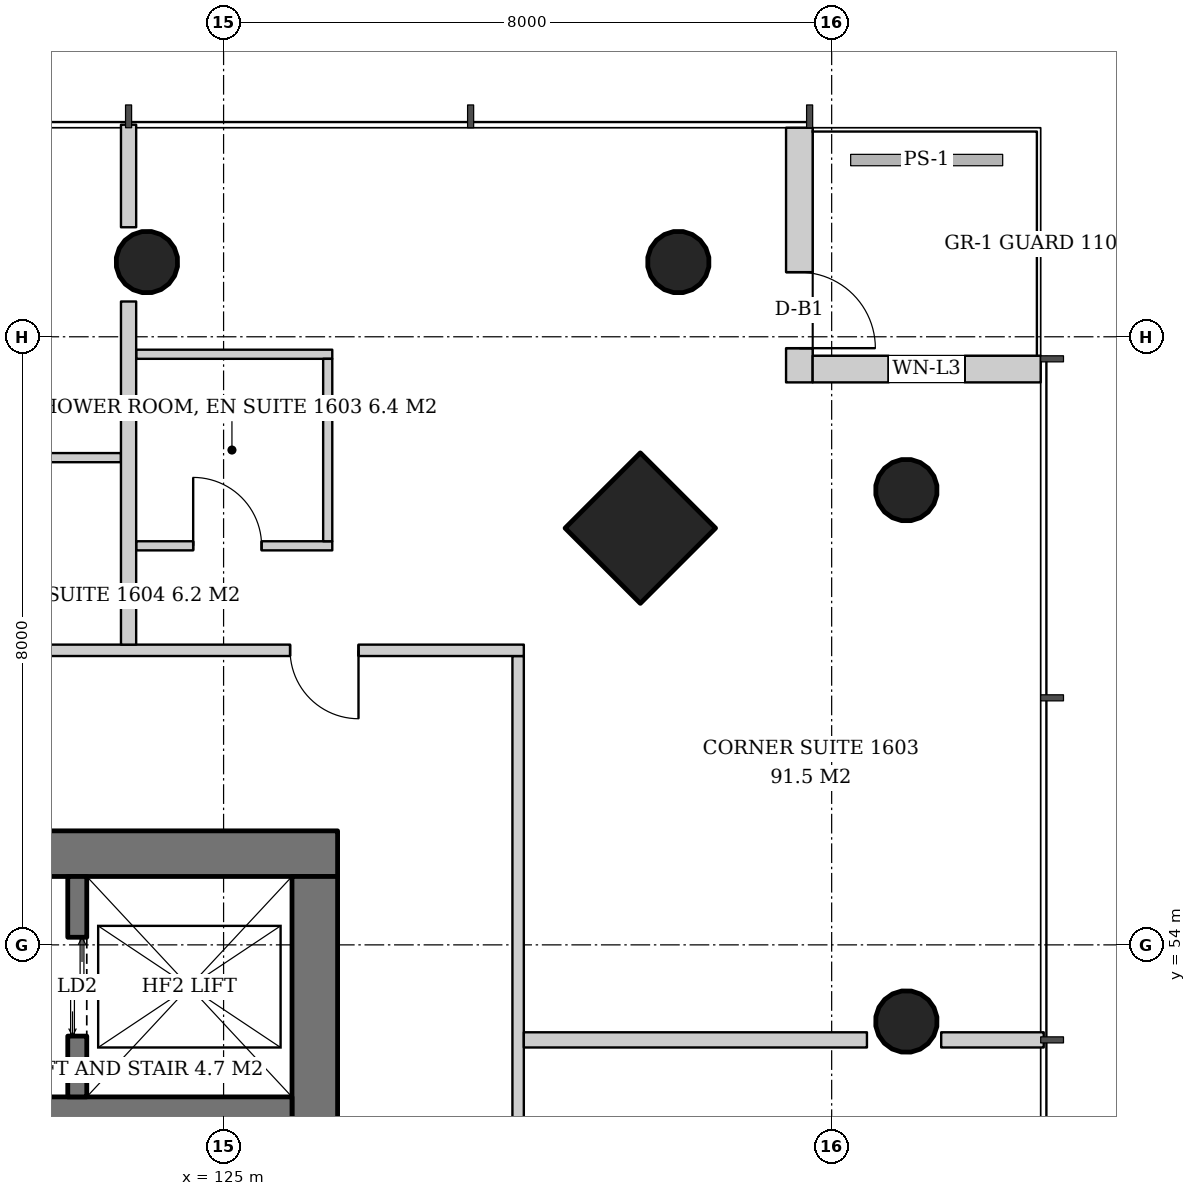
"""IFC4 building model, lengths in metres.
Left out: names, types, materials, properties, quantities, classifications, styles, units other than length and angle.
Written with IfcOpenShell. Run it as: python <this file> out.ifc"""

import sys

from ifc_helpers import new_model, si_unit, direction, frame, frame_2d, origin, origin_2d, place, context, subcontext, project, spatial, rectangle, hollow_circle, extrude, element, fill, save


model = new_model("IFC4")
c1 = context("Model", 3, precision=1e-05, world=origin(), true_north=direction((0.0, 1.0)))
c2 = subcontext(c1, "Body", "Model", "MODEL_VIEW")
j1 = project(units=[si_unit("LENGTHUNIT", "METRE"), si_unit("PLANEANGLEUNIT", "RADIAN")], contexts=[c1])
p1 = place(None, origin())
s1 = spatial("IfcSite", under=j1, at=p1, CompositionType="ELEMENT")
p2 = place(p1, origin())
s2 = spatial("IfcBuilding", under=s1, at=p2, CompositionType="ELEMENT")
p3 = place(p2, frame((0.0, 0.0, 66.6)))
s3 = spatial("IfcBuildingStorey", under=s2, at=p3, CompositionType="ELEMENT", Elevation=66.6)
p4 = place(p3, frame((130.534, 59.534, 0.0), z_axis=(-0.043032401563, -0.043032401563, 0.998146494675), x_axis=(0.707106781187, -0.707106781187, 0.0)))
e1 = element("IfcColumn", 1, at=p4, inside=s3, PredefinedType="COLUMN", context=c2, shape_type="SweptSolid", body=[
    extrude(rectangle(XDim=1.4, YDim=1.4, at=origin_2d()), origin(), (0.0, 0.0, 1.0), 3.807),
])
p5 = place(p3, frame((134.034, 60.034, 0.0), z_axis=(-0.043032401563, -0.043032401563, 0.998146494675), x_axis=(0.707106781187, -0.707106781187, 0.0)))
e2 = element("IfcColumn", 2, at=p5, inside=s3, PredefinedType="COLUMN", context=c2, shape_type="SweptSolid", body=[
    extrude(hollow_circle(Radius=0.406, WallThickness=0.03, at=origin_2d()), origin(), (0.0, 0.0, 1.0), 3.807),
])
p6 = place(p3, frame((134.034, 53.017, 0.0), z_axis=(-0.043062285527, -0.021563230905, 0.998839660125), x_axis=(0.44774654769, -0.894160516368, 0.0)))
e3 = element("IfcColumn", 3, at=p6, inside=s3, PredefinedType="COLUMN", context=c2, shape_type="SweptSolid", body=[
    extrude(hollow_circle(Radius=0.406, WallThickness=0.03, at=origin_2d()), origin(), (0.0, 0.0, 1.0), 3.804),
])
p7 = place(p3, frame((131.034, 63.034, 0.0), z_axis=(-0.043032401563, -0.043032401563, 0.998146494675), x_axis=(0.707106781187, -0.707106781187, 0.0)))
e4 = element("IfcColumn", 4, at=p7, inside=s3, PredefinedType="COLUMN", context=c2, shape_type="SweptSolid", body=[
    extrude(hollow_circle(Radius=0.406, WallThickness=0.03, at=origin_2d()), origin(), (0.0, 0.0, 1.0), 3.807),
])
p8 = place(p3, frame((124.017, 63.034, 0.0), z_axis=(-0.021563230905, -0.043062285527, 0.998839660125), x_axis=(0.894160516368, -0.44774654769, 0.0)))
e5 = element("IfcColumn", 5, at=p8, inside=s3, PredefinedType="COLUMN", context=c2, shape_type="SweptSolid", body=[
    extrude(hollow_circle(Radius=0.406, WallThickness=0.03, at=origin_2d()), origin(), (0.0, 0.0, 1.0), 3.804),
])
p9 = place(p3, frame((107.5, 55.2, 0.0), z_axis=(0.0, 0.0, 1.0), x_axis=(1.0, 0.0, 0.0)))
e6 = element("IfcWall", 6, at=p9, inside=s3, PredefinedType="SHEAR", context=c2, shape_type="SweptSolid", body=[
    extrude(rectangle(XDim=19.0, YDim=0.6, at=frame_2d((9.5, 0.0))), origin(), (0.0, 0.0, 1.0), 3.8),
])
p10 = place(p9, frame((14.14, 0.0, 0.0)))
e7 = element("IfcOpeningElement", 7, at=p10, cuts=e6, PredefinedType="OPENING", context=c2, shape_type="SweptSolid", body=[
    extrude(rectangle(XDim=1.0, YDim=2.1, at=frame_2d((0.5, 1.05))), frame((0.0, 0.31, 0.0), z_axis=(0.0, -1.0, 0.0), x_axis=(1.0, 0.0, 0.0)), (0.0, 0.0, 1.0), 0.62),
])
p11 = place(p9, frame((0.931, 0.0, 0.0)))
e8 = element("IfcOpeningElement", 8, at=p11, cuts=e6, PredefinedType="OPENING", context=c2, shape_type="SweptSolid", body=[
    extrude(rectangle(XDim=1.0, YDim=2.1, at=frame_2d((0.5, 1.05))), frame((0.0, 0.31, 0.0), z_axis=(0.0, -1.0, 0.0), x_axis=(1.0, 0.0, 0.0)), (0.0, 0.0, 1.0), 0.62),
])
p12 = place(p9, frame((2.448, 0.0, 0.0)))
e9 = element("IfcOpeningElement", 9, at=p12, cuts=e6, PredefinedType="OPENING", context=c2, shape_type="SweptSolid", body=[
    extrude(rectangle(XDim=1.0, YDim=2.1, at=frame_2d((0.5, 1.05))), frame((0.0, 0.31, 0.0), z_axis=(0.0, -1.0, 0.0), x_axis=(1.0, 0.0, 0.0)), (0.0, 0.0, 1.0), 0.62),
])
p13 = place(p9, frame((3.983, 0.0, 0.0)))
e10 = element("IfcOpeningElement", 10, at=p13, cuts=e6, PredefinedType="OPENING", context=c2, shape_type="SweptSolid", body=[
    extrude(rectangle(XDim=1.0, YDim=2.1, at=frame_2d((0.5, 1.05))), frame((0.0, 0.31, 0.0), z_axis=(0.0, -1.0, 0.0), x_axis=(1.0, 0.0, 0.0)), (0.0, 0.0, 1.0), 0.62),
])
p14 = place(p3, frame((126.2, 37.1, 0.0), z_axis=(0.0, 0.0, 1.0), x_axis=(0.0, 1.0, 0.0)))
e11 = element("IfcWall", 11, at=p14, inside=s3, PredefinedType="SHEAR", context=c2, shape_type="SweptSolid", body=[
    extrude(rectangle(XDim=17.8, YDim=0.6, at=frame_2d((8.9, 0.0))), origin(), (0.0, 0.0, 1.0), 3.8),
])
p15 = place(p14, frame((8.0, 0.0, 0.0)))
e12 = element("IfcOpeningElement", 12, at=p15, cuts=e11, PredefinedType="OPENING", context=c2, shape_type="SweptSolid", body=[
    extrude(rectangle(XDim=1.8, YDim=2.4, at=frame_2d((0.9, 1.2))), frame((0.0, 0.31, 0.0), z_axis=(0.0, -1.0, 0.0), x_axis=(1.0, 0.0, 0.0)), (0.0, 0.0, 1.0), 0.62),
])
p16 = place(p3, frame((108.1, 51.8, 0.0), z_axis=(0.0, 0.0, 1.0), x_axis=(1.0, 0.0, 0.0)))
e13 = element("IfcWall", 13, at=p16, inside=s3, PredefinedType="SHEAR", context=c2, shape_type="SweptSolid", body=[
    extrude(rectangle(XDim=17.8, YDim=0.4, at=frame_2d((8.9, 0.0))), origin(), (0.0, 0.0, 1.0), 3.8),
])
p17 = place(p3, frame((132.575, 64.75, 0.0), z_axis=(0.0, 0.0, 1.0), x_axis=(0.0, -1.0, 0.0)))
e14 = element("IfcWall", 14, at=p17, inside=s3, PredefinedType="SOLIDWALL", context=c2, shape_type="SweptSolid", body=[
    extrude(rectangle(XDim=3.35, YDim=0.35, at=frame_2d((1.675, 0.0))), origin(), (0.0, 0.0, 1.0), 3.6),
])
p18 = place(p17, frame((1.9, 0.0, 0.0)))
e15 = element("IfcOpeningElement", 15, at=p18, cuts=e14, PredefinedType="OPENING", context=c2, shape_type="SweptSolid", body=[
    extrude(rectangle(XDim=1.0, YDim=2.4, at=frame_2d((0.5, 1.2))), frame((0.0, 0.185, 0.0), z_axis=(0.0, -1.0, 0.0), x_axis=(1.0, 0.0, 0.0)), (0.0, 0.0, 1.0), 0.37),
])
p19 = place(p3, frame((132.75, 61.575, 0.0), z_axis=(0.0, 0.0, 1.0), x_axis=(1.0, 0.0, 0.0)))
e16 = element("IfcWall", 16, at=p19, inside=s3, PredefinedType="SOLIDWALL", context=c2, shape_type="SweptSolid", body=[
    extrude(rectangle(XDim=3.0, YDim=0.35, at=frame_2d((1.5, 0.0))), origin(), (0.0, 0.0, 1.0), 3.6),
])
p20 = place(p19, frame((1.0, 0.0, 0.9)))
e17 = element("IfcOpeningElement", 17, at=p20, cuts=e16, PredefinedType="OPENING", context=c2, shape_type="SweptSolid", body=[
    extrude(rectangle(XDim=1.0, YDim=2.4, at=frame_2d((0.5, 1.2))), frame((0.0, 0.185, 0.0), z_axis=(0.0, -1.0, 0.0), x_axis=(1.0, 0.0, 0.0)), (0.0, 0.0, 1.0), 0.37),
])
p21 = place(p3, frame((123.075, 52.0, 0.0), z_axis=(0.0, 0.0, 1.0), x_axis=(0.0, 1.0, 0.0)))
e18 = element("IfcWall", 18, at=p21, inside=s3, PredefinedType="SHEAR", context=c2, shape_type="SweptSolid", body=[
    extrude(rectangle(XDim=2.9, YDim=0.25, at=frame_2d((1.45, 0.0))), origin(), (0.0, 0.0, 1.0), 3.8),
])
p22 = place(p21, frame((0.8, 0.0, 0.0)))
e19 = element("IfcOpeningElement", 19, at=p22, cuts=e18, PredefinedType="OPENING", context=c2, shape_type="SweptSolid", body=[
    extrude(rectangle(XDim=1.3, YDim=2.2, at=frame_2d((0.65, 1.1))), frame((0.0, 0.135, 0.0), z_axis=(0.0, -1.0, 0.0), x_axis=(1.0, 0.0, 0.0)), (0.0, 0.0, 1.0), 0.27),
])
p23 = place(p3, frame((128.875, 34.05, 0.0), z_axis=(0.0, 0.0, 1.0), x_axis=(0.0, 1.0, 0.0)))
e20 = element("IfcWall", 20, at=p23, inside=s3, PredefinedType="PARTITIONING", context=c2, shape_type="SweptSolid", body=[
    extrude(rectangle(XDim=23.75, YDim=0.15, at=frame_2d((11.875, 0.0))), origin(), (0.0, 0.0, 1.0), 2.8),
])
p24 = place(p23, frame((2.175, 0.0, 0.0)))
e21 = element("IfcOpeningElement", 21, at=p24, cuts=e20, PredefinedType="OPENING", context=c2, shape_type="SweptSolid", body=[
    extrude(rectangle(XDim=0.9, YDim=2.1, at=frame_2d((0.45, 1.05))), frame((0.0, 0.085, 0.0), z_axis=(0.0, -1.0, 0.0), x_axis=(1.0, 0.0, 0.0)), (0.0, 0.0, 1.0), 0.17),
])
p25 = place(p23, frame((12.45, 0.0, 0.0)))
e22 = element("IfcOpeningElement", 22, at=p25, cuts=e20, PredefinedType="OPENING", context=c2, shape_type="SweptSolid", body=[
    extrude(rectangle(XDim=0.9, YDim=2.1, at=frame_2d((0.45, 1.05))), frame((0.0, 0.085, 0.0), z_axis=(0.0, -1.0, 0.0), x_axis=(1.0, 0.0, 0.0)), (0.0, 0.0, 1.0), 0.17),
])
p26 = place(p3, frame((128.95, 52.75, 0.0), z_axis=(0.0, 0.0, 1.0), x_axis=(1.0, 0.0, 0.0)))
e23 = element("IfcWall", 23, at=p26, inside=s3, PredefinedType="PARTITIONING", context=c2, shape_type="SweptSolid", body=[
    extrude(rectangle(XDim=4.514, YDim=0.2, at=frame_2d((2.257, 0.0))), origin(), (0.0, 0.0, 1.0), 3.6),
])
p27 = place(p3, frame((134.441, 52.75, 0.0), z_axis=(0.0, 0.0, 1.0), x_axis=(1.0, 0.0, 0.0)))
e24 = element("IfcWall", 24, at=p27, inside=s3, PredefinedType="PARTITIONING", context=c2, shape_type="SweptSolid", body=[
    extrude(rectangle(XDim=1.349, YDim=0.2, at=frame_2d((0.675, 0.0))), origin(), (0.0, 0.0, 1.0), 3.6),
])
p28 = place(p3, frame((123.85, 59.25, 0.0), z_axis=(0.0, 0.0, 1.0), x_axis=(1.0, 0.0, 0.0)))
e25 = element("IfcWall", 25, at=p28, inside=s3, PredefinedType="PARTITIONING", context=c2, shape_type="SweptSolid", body=[
    extrude(rectangle(XDim=2.58, YDim=0.12, at=frame_2d((1.29, 0.0))), origin(), (0.0, 0.0, 1.0), 2.8),
])
p29 = place(p28, frame((0.75, 0.0, 0.0)))
e26 = element("IfcOpeningElement", 26, at=p29, cuts=e25, PredefinedType="OPENING", context=c2, shape_type="SweptSolid", body=[
    extrude(rectangle(XDim=0.9, YDim=2.1, at=frame_2d((0.45, 1.05))), frame((0.0, 0.07, 0.0), z_axis=(0.0, -1.0, 0.0), x_axis=(1.0, 0.0, 0.0)), (0.0, 0.0, 1.0), 0.14),
])
p30 = place(p3, frame((123.85, 61.77, 0.0), z_axis=(0.0, 0.0, 1.0), x_axis=(1.0, 0.0, 0.0)))
e27 = element("IfcWall", 27, at=p30, inside=s3, PredefinedType="PARTITIONING", context=c2, shape_type="SweptSolid", body=[
    extrude(rectangle(XDim=2.58, YDim=0.12, at=frame_2d((1.29, 0.0))), origin(), (0.0, 0.0, 1.0), 2.8),
])
p31 = place(p3, frame((126.37, 59.31, 0.0), z_axis=(0.0, 0.0, 1.0), x_axis=(0.0, 1.0, 0.0)))
e28 = element("IfcWall", 28, at=p31, inside=s3, PredefinedType="PARTITIONING", context=c2, shape_type="SweptSolid", body=[
    extrude(rectangle(XDim=2.4, YDim=0.12, at=frame_2d((1.2, 0.0))), origin(), (0.0, 0.0, 1.0), 2.8),
])
p32 = place(p3, frame((123.65, 60.41, 0.0), z_axis=(0.0, 0.0, 1.0), x_axis=(-1.0, 0.0, 0.0)))
e29 = element("IfcWall", 29, at=p32, inside=s3, PredefinedType="PARTITIONING", context=c2, shape_type="SweptSolid", body=[
    extrude(rectangle(XDim=2.42, YDim=0.12, at=frame_2d((1.21, 0.0))), origin(), (0.0, 0.0, 1.0), 2.847),
])
p33 = place(p3, frame((128.95, 57.875, 0.0), z_axis=(0.0, 0.0, 1.0), x_axis=(-1.0, 0.0, 0.0)))
e30 = element("IfcWall", 30, at=p33, inside=s3, PredefinedType="PARTITIONING", context=c2, shape_type="SweptSolid", body=[
    extrude(rectangle(XDim=23.75, YDim=0.15, at=frame_2d((11.875, 0.0))), origin(), (0.0, 0.0, 1.0), 2.8),
])
p34 = place(p33, frame((2.175, 0.0, 0.0)))
e31 = element("IfcOpeningElement", 31, at=p34, cuts=e30, PredefinedType="OPENING", context=c2, shape_type="SweptSolid", body=[
    extrude(rectangle(XDim=0.9, YDim=2.1, at=frame_2d((0.45, 1.05))), frame((0.0, 0.085, 0.0), z_axis=(0.0, -1.0, 0.0), x_axis=(1.0, 0.0, 0.0)), (0.0, 0.0, 1.0), 0.17),
])
p35 = place(p33, frame((7.95, 0.0, 0.0)))
e32 = element("IfcOpeningElement", 32, at=p35, cuts=e30, PredefinedType="OPENING", context=c2, shape_type="SweptSolid", body=[
    extrude(rectangle(XDim=0.9, YDim=2.1, at=frame_2d((0.45, 1.05))), frame((0.0, 0.085, 0.0), z_axis=(0.0, -1.0, 0.0), x_axis=(1.0, 0.0, 0.0)), (0.0, 0.0, 1.0), 0.17),
])
p36 = place(p33, frame((10.55, 0.0, 0.0)))
e33 = element("IfcOpeningElement", 33, at=p36, cuts=e30, PredefinedType="OPENING", context=c2, shape_type="SweptSolid", body=[
    extrude(rectangle(XDim=0.9, YDim=2.1, at=frame_2d((0.45, 1.05))), frame((0.0, 0.085, 0.0), z_axis=(0.0, -1.0, 0.0), x_axis=(1.0, 0.0, 0.0)), (0.0, 0.0, 1.0), 0.17),
])
p37 = place(p33, frame((16.95, 0.0, 0.0)))
e34 = element("IfcOpeningElement", 34, at=p37, cuts=e30, PredefinedType="OPENING", context=c2, shape_type="SweptSolid", body=[
    extrude(rectangle(XDim=0.9, YDim=2.1, at=frame_2d((0.45, 1.05))), frame((0.0, 0.085, 0.0), z_axis=(0.0, -1.0, 0.0), x_axis=(1.0, 0.0, 0.0)), (0.0, 0.0, 1.0), 0.17),
])
p38 = place(p3, frame((123.75, 57.95, 0.0), z_axis=(0.0, 0.0, 1.0), x_axis=(0.0, 1.0, 0.0)))
e35 = element("IfcWall", 35, at=p38, inside=s3, PredefinedType="PARTITIONING", context=c2, shape_type="SweptSolid", body=[
    extrude(rectangle(XDim=4.514, YDim=0.2, at=frame_2d((2.257, 0.0))), origin(), (0.0, 0.0, 1.0), 3.6),
])
p39 = place(p3, frame((123.75, 63.441, 0.0), z_axis=(0.0, 0.0, 1.0), x_axis=(0.0, 1.0, 0.0)))
e36 = element("IfcWall", 36, at=p39, inside=s3, PredefinedType="PARTITIONING", context=c2, shape_type="SweptSolid", body=[
    extrude(rectangle(XDim=1.349, YDim=0.2, at=frame_2d((0.675, 0.0))), origin(), (0.0, 0.0, 1.0), 3.6),
])
p40 = place(p18, origin())
e37 = element("IfcDoor", 37, at=p40, inside=s3, OperationType="SINGLE_SWING_RIGHT", PredefinedType="DOOR", context=c2, shape_type="SweptSolid", body=[
    extrude(rectangle(XDim=1.0, YDim=2.4, at=frame_2d((0.5, 1.2))), frame((0.0, 0.025, 0.0), z_axis=(0.0, -1.0, 0.0), x_axis=(1.0, 0.0, 0.0)), (0.0, 0.0, 1.0), 0.05),
])
fill(e15, e37)
p41 = place(p20, origin())
e38 = element("IfcWindow", 38, at=p41, inside=s3, PartitioningType="SINGLE_PANEL", PredefinedType="WINDOW", context=c2, shape_type="SweptSolid", body=[
    extrude(rectangle(XDim=1.0, YDim=2.4, at=frame_2d((0.5, 1.2))), frame((0.0, 0.03, 0.0), z_axis=(0.0, -1.0, 0.0), x_axis=(1.0, 0.0, 0.0)), (0.0, 0.0, 1.0), 0.06),
])
fill(e17, e38)
p42 = place(p22, origin())
e39 = element("IfcDoor", 39, at=p42, inside=s3, OperationType="DOUBLE_DOOR_SLIDING", PredefinedType="DOOR", context=c2, shape_type="SweptSolid", body=[
    extrude(rectangle(XDim=1.3, YDim=2.2, at=frame_2d((0.65, 1.1))), frame((0.0, 0.025, 0.0), z_axis=(0.0, -1.0, 0.0), x_axis=(1.0, 0.0, 0.0)), (0.0, 0.0, 1.0), 0.05),
])
fill(e19, e39)
p43 = place(p29, origin())
e40 = element("IfcDoor", 40, at=p43, inside=s3, OperationType="SINGLE_SWING_LEFT", PredefinedType="DOOR", context=c2, shape_type="SweptSolid", body=[
    extrude(rectangle(XDim=0.9, YDim=2.1, at=frame_2d((0.45, 1.05))), frame((0.0, 0.025, 0.0), z_axis=(0.0, -1.0, 0.0), x_axis=(1.0, 0.0, 0.0)), (0.0, 0.0, 1.0), 0.05),
])
fill(e26, e40)
p44 = place(p34, origin())
e41 = element("IfcDoor", 41, at=p44, inside=s3, OperationType="SINGLE_SWING_LEFT", PredefinedType="DOOR", context=c2, shape_type="SweptSolid", body=[
    extrude(rectangle(XDim=0.9, YDim=2.1, at=frame_2d((0.45, 1.05))), frame((0.0, 0.025, 0.0), z_axis=(0.0, -1.0, 0.0), x_axis=(1.0, 0.0, 0.0)), (0.0, 0.0, 1.0), 0.05),
])
fill(e31, e41)
save(model, sys.argv[1])
